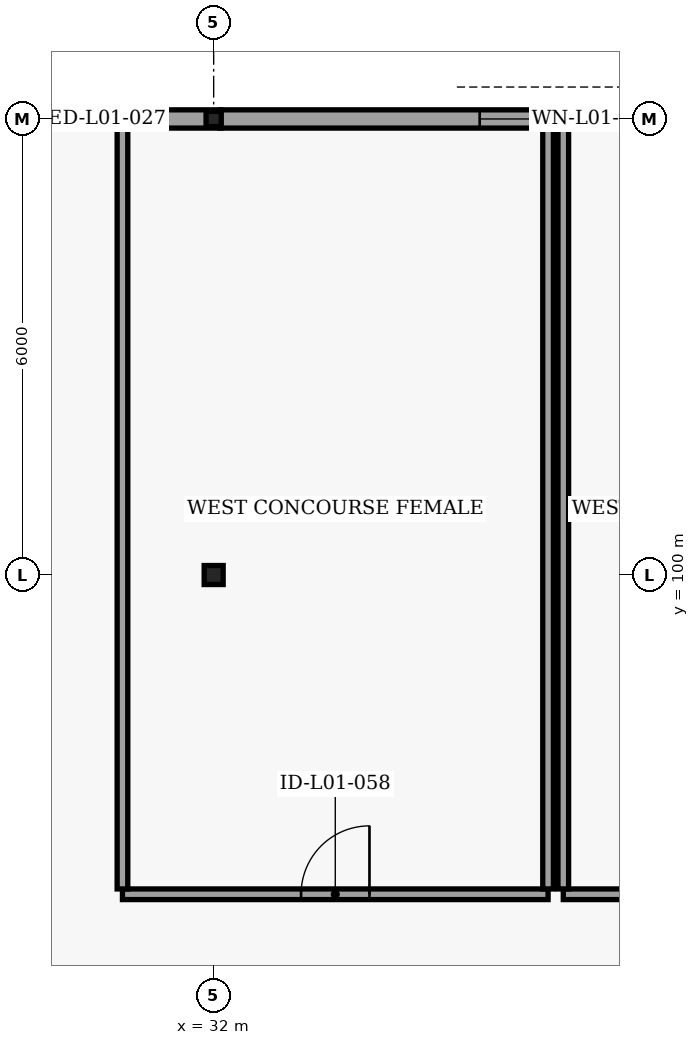
"""IFC4 building model, lengths in metres.
Left out: names, types, materials, properties, quantities, classifications, styles, units other than length and angle.
Written with IfcOpenShell. Run it as: python <this file> out.ifc"""

import sys

from ifc_helpers import new_model, si_unit, direction, frame, frame_2d, origin, origin_2d, place, context, subcontext, project, spatial, rectangle, hollow_rectangle, extrude, element, fill, save


model = new_model("IFC4")
c1 = context("Model", 3, precision=1e-05, world=origin(), true_north=direction((0.0, 1.0)))
c2 = subcontext(c1, "Body", "Model", "MODEL_VIEW")
j1 = project(units=[si_unit("LENGTHUNIT", "METRE"), si_unit("PLANEANGLEUNIT", "RADIAN")], contexts=[c1])
p1 = place(None, origin())
s1 = spatial("IfcSite", under=j1, at=p1, CompositionType="ELEMENT")
p2 = place(p1, origin())
s2 = spatial("IfcBuilding", under=s1, at=p2, CompositionType="ELEMENT")
p3 = place(p2, origin())
s3 = spatial("IfcBuildingStorey", under=s2, at=p3, CompositionType="ELEMENT", Elevation=0.0)
p4 = place(p3, frame((32.0, 100.0, -0.45), z_axis=(0.0, 0.0, 1.0), x_axis=(1.0, 0.0, 0.0)))
e1 = element("IfcColumn", 1, at=p4, inside=s3, PredefinedType="COLUMN", context=c2, shape_type="SweptSolid", body=[
    extrude(hollow_rectangle(XDim=0.25, YDim=0.25, WallThickness=0.012, InnerFilletRadius=0.012, OuterFilletRadius=0.025, at=origin_2d()), origin(), (0.0, 0.0, 1.0), 5.57),
])
p5 = place(p3, frame((32.0, 106.0, -0.45), z_axis=(0.0, 0.0, 1.0), x_axis=(1.0, 0.0, 0.0)))
e2 = element("IfcColumn", 2, at=p5, inside=s3, PredefinedType="COLUMN", context=c2, shape_type="SweptSolid", body=[
    extrude(hollow_rectangle(XDim=0.2, YDim=0.2, WallThickness=0.01, InnerFilletRadius=0.01, OuterFilletRadius=0.02, at=origin_2d()), origin(), (0.0, 0.0, 1.0), 5.57),
])
p6 = place(p3, frame((24.085, 106.0, 0.0), z_axis=(0.0, 0.0, 1.0), x_axis=(1.0, 0.0, 0.0)))
e3 = element("IfcWall", 3, at=p6, inside=s3, PredefinedType="ELEMENTEDWALL", context=c2, shape_type="SweptSolid", body=[
    extrude(rectangle(XDim=8.012, YDim=0.24, at=frame_2d((4.006, 0.0))), origin(), (0.0, 0.0, 1.0), 4.658),
])
p7 = place(p6, frame((2.715, 0.0, 0.0)))
e4 = element("IfcOpeningElement", 4, at=p7, cuts=e3, PredefinedType="OPENING", context=c2, shape_type="SweptSolid", body=[
    extrude(rectangle(XDim=2.4, YDim=2.4, at=frame_2d((1.2, 1.2))), frame((0.0, 0.13, 0.0), z_axis=(0.0, -1.0, 0.0), x_axis=(1.0, 0.0, 0.0)), (0.0, 0.0, 1.0), 0.26),
])
p8 = place(p3, frame((32.085, 106.0, 0.0), z_axis=(0.0, 0.0, 1.0), x_axis=(1.0, 0.0, 0.0)))
e5 = element("IfcWall", 5, at=p8, inside=s3, PredefinedType="ELEMENTEDWALL", context=c2, shape_type="SweptSolid", body=[
    extrude(rectangle(XDim=9.83, YDim=0.24, at=frame_2d((4.915, 0.0))), origin(), (0.0, 0.0, 1.0), 4.658),
])
p9 = place(p8, frame((3.415, 0.0, 1.0)))
e6 = element("IfcOpeningElement", 6, at=p9, cuts=e5, PredefinedType="OPENING", context=c2, shape_type="SweptSolid", body=[
    extrude(rectangle(XDim=3.0, YDim=1.6, at=frame_2d((1.5, 0.8))), frame((0.0, 0.13, 0.0), z_axis=(0.0, -1.0, 0.0), x_axis=(1.0, 0.0, 0.0)), (0.0, 0.0, 1.0), 0.26),
])
p10 = place(p3, frame((30.8, 95.8, 0.0), z_axis=(0.0, 0.0, 1.0), x_axis=(1.0, 0.0, 0.0)))
e7 = element("IfcWall", 7, at=p10, inside=s3, PredefinedType="PARTITIONING", context=c2, shape_type="SweptSolid", body=[
    extrude(rectangle(XDim=5.6, YDim=0.14, at=frame_2d((2.8, 0.0))), origin(), (0.0, 0.0, 1.0), 4.703),
])
p11 = place(p10, frame((2.35, 0.0, 0.0)))
e8 = element("IfcOpeningElement", 8, at=p11, cuts=e7, PredefinedType="OPENING", context=c2, shape_type="SweptSolid", body=[
    extrude(rectangle(XDim=0.9, YDim=2.1, at=frame_2d((0.45, 1.05))), frame((0.0, 0.08, 0.0), z_axis=(0.0, -1.0, 0.0), x_axis=(1.0, 0.0, 0.0)), (0.0, 0.0, 1.0), 0.16),
])
for number, where, z_axis, x_axis in (
    (9, (30.8, 95.87, 0.0), (0.0, 0.0, 1.0), (0.0, 1.0, 0.0)),
    (10, (36.4, 95.87, 0.0), (0.0, 0.0, 1.0), (0.0, 1.0, 0.0)),
):
    element("IfcWall", number, at=place(p3, frame(where, z_axis=z_axis, x_axis=x_axis)), inside=s3, PredefinedType="PARTITIONING", context=c2, shape_type="SweptSolid", body=[
        extrude(rectangle(XDim=10.05, YDim=0.14, at=frame_2d((5.025, 0.0))), origin(), (0.0, 0.0, 1.0), 4.66),
    ])
p12 = place(p3, frame((36.6, 95.8, 0.0), z_axis=(0.0, 0.0, 1.0), x_axis=(1.0, 0.0, 0.0)))
e11 = element("IfcWall", 11, at=p12, inside=s3, PredefinedType="PARTITIONING", context=c2, shape_type="SweptSolid", body=[
    extrude(rectangle(XDim=4.7, YDim=0.14, at=frame_2d((2.35, 0.0))), origin(), (0.0, 0.0, 1.0), 5.1),
])
p13 = place(p12, frame((1.85, 0.0, 0.0)))
e12 = element("IfcOpeningElement", 12, at=p13, cuts=e11, PredefinedType="OPENING", context=c2, shape_type="SweptSolid", body=[
    extrude(rectangle(XDim=1.0, YDim=2.15, at=frame_2d((0.5, 1.075))), frame((0.0, 0.08, 0.0), z_axis=(0.0, -1.0, 0.0), x_axis=(1.0, 0.0, 0.0)), (0.0, 0.0, 1.0), 0.16),
])
p14 = place(p3, frame((36.6, 95.87, 0.0), z_axis=(0.0, 0.0, 1.0), x_axis=(0.0, 1.0, 0.0)))
e13 = element("IfcWall", 13, at=p14, inside=s3, PredefinedType="PARTITIONING", context=c2, shape_type="SweptSolid", body=[
    extrude(rectangle(XDim=10.05, YDim=0.14, at=frame_2d((5.025, 0.0))), origin(), (0.0, 0.0, 1.0), 4.66),
])
p15 = place(p9, origin())
e14 = element("IfcWindow", 14, at=p15, inside=s3, PartitioningType="SINGLE_PANEL", PredefinedType="WINDOW", context=c2, shape_type="SweptSolid", body=[
    extrude(rectangle(XDim=3.0, YDim=1.6, at=frame_2d((1.5, 0.8))), frame((0.0, 0.03, 0.0), z_axis=(0.0, -1.0, 0.0), x_axis=(1.0, 0.0, 0.0)), (0.0, 0.0, 1.0), 0.06),
])
fill(e6, e14)
p16 = place(p11, origin())
e15 = element("IfcDoor", 15, at=p16, inside=s3, OperationType="SINGLE_SWING_RIGHT", PredefinedType="DOOR", context=c2, shape_type="SweptSolid", body=[
    extrude(rectangle(XDim=0.9, YDim=2.1, at=frame_2d((0.45, 1.05))), frame((0.0, 0.025, 0.0), z_axis=(0.0, -1.0, 0.0), x_axis=(1.0, 0.0, 0.0)), (0.0, 0.0, 1.0), 0.05),
])
fill(e8, e15)
save(model, sys.argv[1])
